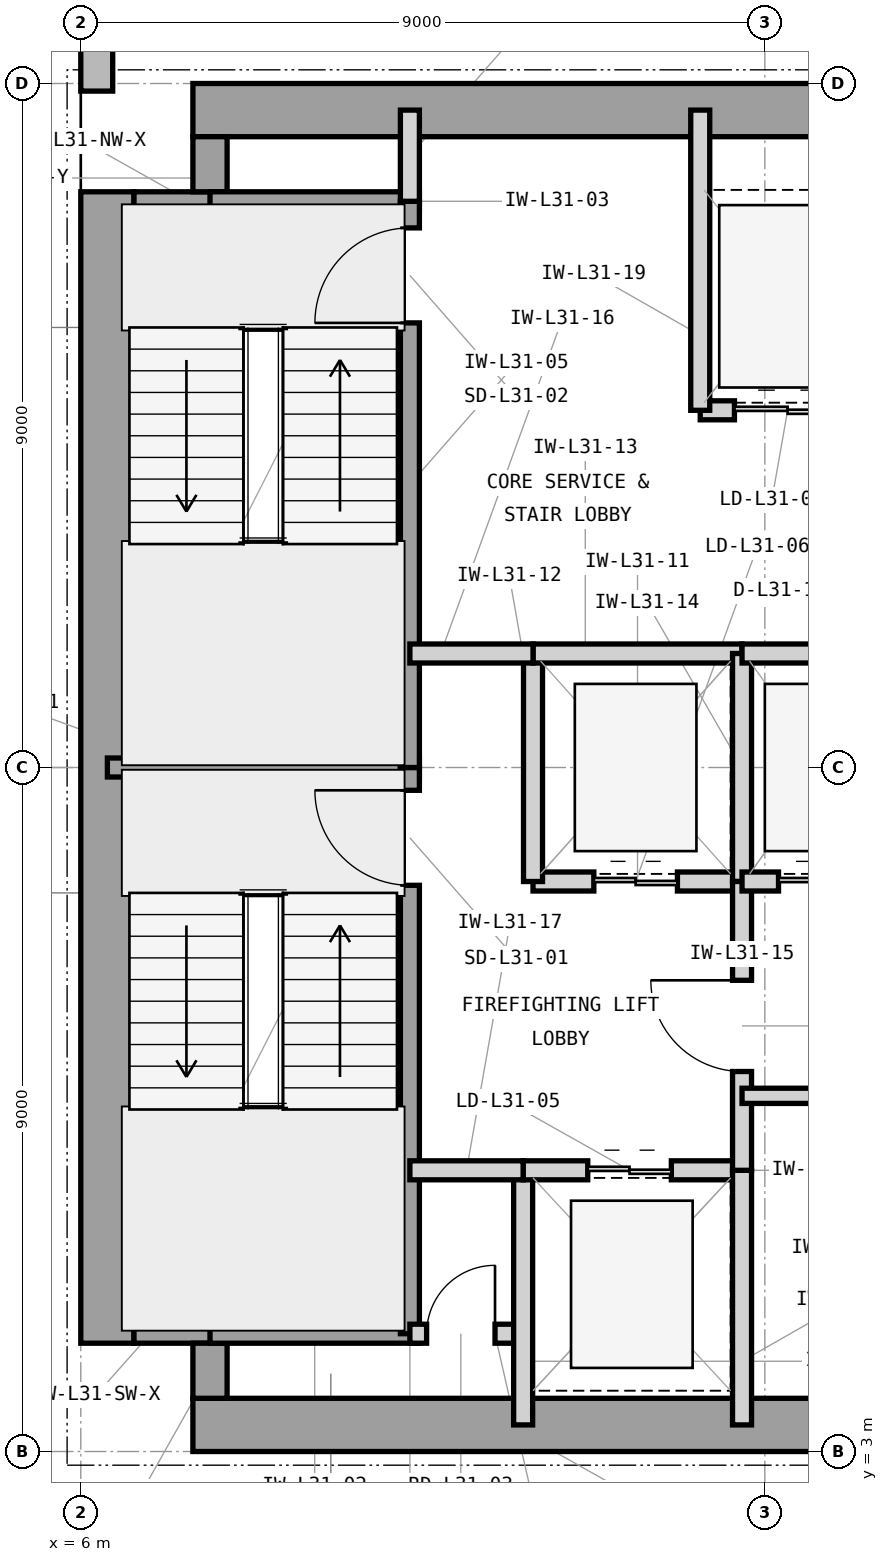
"""IFC4 building model, lengths in metres.
Left out: names, types, materials, properties, quantities, classifications, styles, units other than length and angle.
Written with IfcOpenShell. Run it as: python <this file> out.ifc"""

import sys

from ifc_helpers import new_model, si_unit, direction, frame, frame_2d, origin, place, context, subcontext, project, spatial, rectangle, extrude, element, fill, save


model = new_model("IFC4")
c1 = context("Model", 3, precision=1e-05, world=origin(), true_north=direction((0.0, 1.0)))
c2 = subcontext(c1, "Body", "Model", "MODEL_VIEW")
j1 = project(units=[si_unit("LENGTHUNIT", "METRE"), si_unit("PLANEANGLEUNIT", "RADIAN")], contexts=[c1])
p1 = place(None, origin())
s1 = spatial("IfcSite", under=j1, at=p1, CompositionType="ELEMENT")
p2 = place(p1, origin())
s2 = spatial("IfcBuilding", under=s1, at=p2, CompositionType="ELEMENT")
p3 = place(p2, frame((0.0, 0.0, 132.3)))
s3 = spatial("IfcBuildingStorey", under=s2, at=p3, CompositionType="ELEMENT", Elevation=132.3)
p4 = place(p3, frame((7.475, 3.35, 0.0), z_axis=(0.0, 0.0, 1.0), x_axis=(1.0, 0.0, 0.0)))
e1 = element("IfcWall", 1, at=p4, inside=s3, PredefinedType="SHEAR", context=c2, shape_type="SweptSolid", body=[
    extrude(rectangle(XDim=16.525, YDim=0.7, at=frame_2d((8.262, 0.0))), origin(), (0.0, 0.0, 1.0), 3.9),
])
p5 = place(p3, frame((6.35, 4.425, 0.0), z_axis=(0.0, 0.0, 1.0), x_axis=(0.0, 1.0, 0.0)))
e2 = element("IfcWall", 2, at=p5, inside=s3, PredefinedType="SHEAR", context=c2, shape_type="SweptSolid", body=[
    extrude(rectangle(XDim=15.15, YDim=0.7, at=frame_2d((7.575, 0.0))), origin(), (0.0, 0.0, 1.0), 3.9),
])
p6 = place(p3, frame((7.475, 20.65, 0.0), z_axis=(0.0, 0.0, 1.0), x_axis=(1.0, 0.0, 0.0)))
e3 = element("IfcWall", 3, at=p6, inside=s3, PredefinedType="SHEAR", context=c2, shape_type="SweptSolid", body=[
    extrude(rectangle(XDim=12.325, YDim=0.7, at=frame_2d((6.163, 0.0))), origin(), (0.0, 0.0, 1.0), 3.9),
])
p7 = place(p3, frame((6.7, 4.65, 0.0), z_axis=(0.0, 0.0, 1.0), x_axis=(1.0, 0.0, 0.0)))
e4 = element("IfcWall", 4, at=p7, inside=s3, PredefinedType="SHEAR", context=c2, shape_type="SweptSolid", body=[
    extrude(rectangle(XDim=1.225, YDim=0.45, at=frame_2d((0.613, 0.0))), origin(), (0.0, 0.0, 1.0), 3.9),
])
p8 = place(p3, frame((7.7, 3.7, 0.0), z_axis=(0.0, 0.0, 1.0), x_axis=(0.0, 1.0, 0.0)))
e5 = element("IfcWall", 5, at=p8, inside=s3, PredefinedType="SHEAR", context=c2, shape_type="SweptSolid", body=[
    extrude(rectangle(XDim=0.725, YDim=0.45, at=frame_2d((0.363, 0.0))), origin(), (0.0, 0.0, 1.0), 3.9),
])
p9 = place(p3, frame((6.7, 19.35, 0.0), z_axis=(0.0, 0.0, 1.0), x_axis=(1.0, 0.0, 0.0)))
e6 = element("IfcWall", 6, at=p9, inside=s3, PredefinedType="SHEAR", context=c2, shape_type="SweptSolid", body=[
    extrude(rectangle(XDim=1.225, YDim=0.45, at=frame_2d((0.613, 0.0))), origin(), (0.0, 0.0, 1.0), 3.9),
])
p10 = place(p3, frame((7.7, 19.575, 0.0), z_axis=(0.0, 0.0, 1.0), x_axis=(0.0, 1.0, 0.0)))
e7 = element("IfcWall", 7, at=p10, inside=s3, PredefinedType="SHEAR", context=c2, shape_type="SweptSolid", body=[
    extrude(rectangle(XDim=0.725, YDim=0.45, at=frame_2d((0.363, 0.0))), origin(), (0.0, 0.0, 1.0), 3.9),
])
p11 = place(p3, frame((6.21, 46.4, 0.0), z_axis=(0.0, 0.0, 1.0), x_axis=(0.0, -1.0, 0.0)))
e8 = element("IfcWall", 8, at=p11, inside=s3, PredefinedType="STANDARD", context=c2, shape_type="SweptSolid", body=[
    extrude(rectangle(XDim=25.5, YDim=0.42, at=frame_2d((12.75, 0.0))), origin(), (0.0, 0.0, 1.0), 3.7),
])
p12 = place(p11, frame((11.5, 0.0, 0.85)))
e9 = element("IfcOpeningElement", 9, at=p12, cuts=e8, PredefinedType="OPENING", context=c2, shape_type="SweptSolid", body=[
    extrude(rectangle(XDim=2.5, YDim=2.25, at=frame_2d((1.25, 1.125))), frame((0.0, 0.22, 0.0), z_axis=(0.0, -1.0, 0.0), x_axis=(1.0, 0.0, 0.0)), (0.0, 0.0, 1.0), 0.44),
])
p13 = place(p11, frame((8.236, 0.0, 0.85)))
e10 = element("IfcOpeningElement", 10, at=p13, cuts=e8, PredefinedType="OPENING", context=c2, shape_type="SweptSolid", body=[
    extrude(rectangle(XDim=1.2, YDim=2.25, at=frame_2d((0.6, 1.125))), frame((0.0, 0.22, 0.0), z_axis=(0.0, -1.0, 0.0), x_axis=(1.0, 0.0, 0.0)), (0.0, 0.0, 1.0), 0.44),
])
p14 = place(p3, frame((6.35, 12.0, 0.0), z_axis=(0.0, 0.0, 1.0), x_axis=(1.0, 0.0, 0.0)))
e11 = element("IfcWall", 11, at=p14, inside=s3, PredefinedType="SHEAR", context=c2, shape_type="SweptSolid", body=[
    extrude(rectangle(XDim=4.105, YDim=0.25, at=frame_2d((2.052, 0.0))), origin(), (0.0, 0.0, 1.0), 3.9),
])
for number, where, z_axis, x_axis in (
    (12, (7.7, 4.55, 0.0), (0.0, 0.0, 1.0), (1.0, 0.0, 0.0)),
    (13, (7.7, 19.45, 0.0), (0.0, 0.0, 1.0), (1.0, 0.0, 0.0)),
):
    element("IfcWall", number, at=place(p3, frame(where, z_axis=z_axis, x_axis=x_axis)), inside=s3, PredefinedType="SHEAR", context=c2, shape_type="SweptSolid", body=[
        extrude(rectangle(XDim=2.755, YDim=0.25, at=frame_2d((1.377, 0.0))), origin(), (0.0, 0.0, 1.0), 3.9),
    ])
p15 = place(p3, frame((10.33, 4.55, 0.0), z_axis=(0.0, 0.0, 1.0), x_axis=(0.0, 1.0, 0.0)))
e14 = element("IfcWall", 14, at=p15, inside=s3, PredefinedType="SHEAR", context=c2, shape_type="SweptSolid", body=[
    extrude(rectangle(XDim=7.45, YDim=0.25, at=frame_2d((3.725, 0.0))), origin(), (0.0, 0.0, 1.0), 3.9),
])
p16 = place(p15, frame((5.9, 0.0, 0.0)))
e15 = element("IfcOpeningElement", 15, at=p16, cuts=e14, PredefinedType="OPENING", context=c2, shape_type="SweptSolid", body=[
    extrude(rectangle(XDim=1.25, YDim=2.2, at=frame_2d((0.625, 1.1))), frame((0.0, 0.135, 0.0), z_axis=(0.0, -1.0, 0.0), x_axis=(1.0, 0.0, 0.0)), (0.0, 0.0, 1.0), 0.27),
])
p17 = place(p3, frame((10.33, 12.0, 0.0), z_axis=(0.0, 0.0, 1.0), x_axis=(0.0, 1.0, 0.0)))
e16 = element("IfcWall", 16, at=p17, inside=s3, PredefinedType="SHEAR", context=c2, shape_type="SweptSolid", body=[
    extrude(rectangle(XDim=7.45, YDim=0.25, at=frame_2d((3.725, 0.0))), origin(), (0.0, 0.0, 1.0), 3.9),
])
p18 = place(p17, frame((5.85, 0.0, 0.0)))
e17 = element("IfcOpeningElement", 17, at=p18, cuts=e16, PredefinedType="OPENING", context=c2, shape_type="SweptSolid", body=[
    extrude(rectangle(XDim=1.25, YDim=2.2, at=frame_2d((0.625, 1.1))), frame((0.0, 0.135, 0.0), z_axis=(0.0, -1.0, 0.0), x_axis=(1.0, 0.0, 0.0)), (0.0, 0.0, 1.0), 0.27),
])
p19 = place(p3, frame((10.33, 4.55, 0.0), z_axis=(0.0, 0.0, 1.0), x_axis=(1.0, 0.0, 0.0)))
e18 = element("IfcWall", 18, at=p19, inside=s3, PredefinedType="PARTITIONING", context=c2, shape_type="SweptSolid", body=[
    extrude(rectangle(XDim=1.49, YDim=0.25, at=frame_2d((0.745, 0.0))), origin(), (0.0, 0.0, 1.0), 3.69),
])
p20 = place(p19, frame((0.22, 0.0, 0.0)))
e19 = element("IfcOpeningElement", 19, at=p20, cuts=e18, PredefinedType="OPENING", context=c2, shape_type="SweptSolid", body=[
    extrude(rectangle(XDim=0.9, YDim=2.1, at=frame_2d((0.45, 1.05))), frame((0.0, 0.135, 0.0), z_axis=(0.0, -1.0, 0.0), x_axis=(1.0, 0.0, 0.0)), (0.0, 0.0, 1.0), 0.27),
])
p21 = place(p3, frame((11.82, 3.35, 0.0), z_axis=(0.0, 0.0, 1.0), x_axis=(0.0, 1.0, 0.0)))
e20 = element("IfcWall", 20, at=p21, inside=s3, PredefinedType="PARTITIONING", context=c2, shape_type="SweptSolid", body=[
    extrude(rectangle(XDim=3.35, YDim=0.25, at=frame_2d((1.675, 0.0))), origin(), (0.0, 0.0, 1.0), 3.69),
])
p22 = place(p3, frame((10.33, 19.45, 0.0), z_axis=(0.0, 0.0, 1.0), x_axis=(0.0, 1.0, 0.0)))
e21 = element("IfcWall", 21, at=p22, inside=s3, PredefinedType="PARTITIONING", context=c2, shape_type="SweptSolid", body=[
    extrude(rectangle(XDim=1.2, YDim=0.25, at=frame_2d((0.6, 0.0))), origin(), (0.0, 0.0, 1.0), 2.994),
])
p23 = place(p3, frame((11.82, 6.7, 0.0), z_axis=(0.0, 0.0, 1.0), x_axis=(1.0, 0.0, 0.0)))
e22 = element("IfcWall", 22, at=p23, inside=s3, PredefinedType="PARTITIONING", context=c2, shape_type="SweptSolid", body=[
    extrude(rectangle(XDim=2.88, YDim=0.25, at=frame_2d((1.44, 0.0))), origin(), (0.0, 0.0, 1.0), 3.233),
])
p24 = place(p23, frame((0.85, 0.0, 0.0)))
e23 = element("IfcOpeningElement", 23, at=p24, cuts=e22, PredefinedType="OPENING", context=c2, shape_type="SweptSolid", body=[
    extrude(rectangle(XDim=1.1, YDim=2.25, at=frame_2d((0.55, 1.125))), frame((0.0, 0.135, 0.0), z_axis=(0.0, -1.0, 0.0), x_axis=(1.0, 0.0, 0.0)), (0.0, 0.0, 1.0), 0.27),
])
p25 = place(p3, frame((14.7, 3.35, 0.0), z_axis=(0.0, 0.0, 1.0), x_axis=(0.0, 1.0, 0.0)))
e24 = element("IfcWall", 24, at=p25, inside=s3, PredefinedType="PARTITIONING", context=c2, shape_type="SweptSolid", body=[
    extrude(rectangle(XDim=3.35, YDim=0.25, at=frame_2d((1.675, 0.0))), origin(), (0.0, 0.0, 1.0), 3.69),
])
p26 = place(p3, frame((11.95, 10.5, 0.0), z_axis=(0.0, 0.0, 1.0), x_axis=(1.0, 0.0, 0.0)))
e25 = element("IfcWall", 25, at=p26, inside=s3, PredefinedType="PARTITIONING", context=c2, shape_type="SweptSolid", body=[
    extrude(rectangle(XDim=2.75, YDim=0.25, at=frame_2d((1.375, 0.0))), origin(), (0.0, 0.0, 1.0), 3.233),
])
p27 = place(p26, frame((0.8, 0.0, 0.0)))
e26 = element("IfcOpeningElement", 26, at=p27, cuts=e25, PredefinedType="OPENING", context=c2, shape_type="SweptSolid", body=[
    extrude(rectangle(XDim=1.1, YDim=2.25, at=frame_2d((0.55, 1.125))), frame((0.0, 0.135, 0.0), z_axis=(0.0, -1.0, 0.0), x_axis=(1.0, 0.0, 0.0)), (0.0, 0.0, 1.0), 0.27),
])
p28 = place(p3, frame((11.95, 10.5, 0.0), z_axis=(0.0, 0.0, 1.0), x_axis=(0.0, 1.0, 0.0)))
e27 = element("IfcWall", 27, at=p28, inside=s3, PredefinedType="PARTITIONING", context=c2, shape_type="SweptSolid", body=[
    extrude(rectangle(XDim=3.0, YDim=0.25, at=frame_2d((1.5, 0.0))), origin(), (0.0, 0.0, 1.0), 3.69),
])
p29 = place(p3, frame((11.95, 13.5, 0.0), z_axis=(0.0, 0.0, 1.0), x_axis=(1.0, 0.0, 0.0)))
e28 = element("IfcWall", 28, at=p29, inside=s3, PredefinedType="PARTITIONING", context=c2, shape_type="SweptSolid", body=[
    extrude(rectangle(XDim=2.75, YDim=0.25, at=frame_2d((1.375, 0.0))), origin(), (0.0, 0.0, 1.0), 3.233),
])
p30 = place(p3, frame((14.7, 10.5, 0.0), z_axis=(0.0, 0.0, 1.0), x_axis=(0.0, 1.0, 0.0)))
e29 = element("IfcWall", 29, at=p30, inside=s3, PredefinedType="PARTITIONING", context=c2, shape_type="SweptSolid", body=[
    extrude(rectangle(XDim=3.0, YDim=0.25, at=frame_2d((1.5, 0.0))), origin(), (0.0, 0.0, 1.0), 3.69),
])
p31 = place(p3, frame((14.7, 6.7, 0.0), z_axis=(0.0, 0.0, 1.0), x_axis=(0.0, 1.0, 0.0)))
e30 = element("IfcWall", 30, at=p31, inside=s3, PredefinedType="PARTITIONING", context=c2, shape_type="SweptSolid", body=[
    extrude(rectangle(XDim=3.8, YDim=0.25, at=frame_2d((1.9, 0.0))), origin(), (0.0, 0.0, 1.0), 3.69),
])
p32 = place(p31, frame((1.3, 0.0, 0.0)))
e31 = element("IfcOpeningElement", 31, at=p32, cuts=e30, PredefinedType="OPENING", context=c2, shape_type="SweptSolid", body=[
    extrude(rectangle(XDim=1.2, YDim=2.2, at=frame_2d((0.6, 1.1))), frame((0.0, 0.135, 0.0), z_axis=(0.0, -1.0, 0.0), x_axis=(1.0, 0.0, 0.0)), (0.0, 0.0, 1.0), 0.27),
])
p33 = place(p3, frame((10.33, 13.5, 0.0), z_axis=(0.0, 0.0, 1.0), x_axis=(1.0, 0.0, 0.0)))
e32 = element("IfcWall", 32, at=p33, inside=s3, PredefinedType="PARTITIONING", context=c2, shape_type="SweptSolid", body=[
    extrude(rectangle(XDim=1.62, YDim=0.25, at=frame_2d((0.81, 0.0))), origin(), (0.0, 0.0, 1.0), 3.233),
])
p34 = place(p3, frame((10.33, 6.7, 0.0), z_axis=(0.0, 0.0, 1.0), x_axis=(1.0, 0.0, 0.0)))
e33 = element("IfcWall", 33, at=p34, inside=s3, PredefinedType="PARTITIONING", context=c2, shape_type="SweptSolid", body=[
    extrude(rectangle(XDim=1.49, YDim=0.25, at=frame_2d((0.745, 0.0))), origin(), (0.0, 0.0, 1.0), 3.233),
])
p35 = place(p3, frame((14.15, 16.7, 0.0), z_axis=(0.0, 0.0, 1.0), x_axis=(1.0, 0.0, 0.0)))
e34 = element("IfcWall", 34, at=p35, inside=s3, PredefinedType="PARTITIONING", context=c2, shape_type="SweptSolid", body=[
    extrude(rectangle(XDim=2.3, YDim=0.25, at=frame_2d((1.15, 0.0))), origin(), (0.0, 0.0, 1.0), 3.233),
])
p36 = place(p35, frame((0.45, 0.0, 0.0)))
e35 = element("IfcOpeningElement", 35, at=p36, cuts=e34, PredefinedType="OPENING", context=c2, shape_type="SweptSolid", body=[
    extrude(rectangle(XDim=1.4, YDim=2.35, at=frame_2d((0.7, 1.175))), frame((0.0, 0.135, 0.0), z_axis=(0.0, -1.0, 0.0), x_axis=(1.0, 0.0, 0.0)), (0.0, 0.0, 1.0), 0.27),
])
p37 = place(p3, frame((14.15, 16.7, 0.0), z_axis=(0.0, 0.0, 1.0), x_axis=(0.0, 1.0, 0.0)))
e36 = element("IfcWall", 36, at=p37, inside=s3, PredefinedType="PARTITIONING", context=c2, shape_type="SweptSolid", body=[
    extrude(rectangle(XDim=3.95, YDim=0.25, at=frame_2d((1.975, 0.0))), origin(), (0.0, 0.0, 1.0), 3.69),
])
p38 = place(p3, frame((14.7, 7.68, 0.0), z_axis=(0.0, 0.0, 1.0), x_axis=(1.0, 0.0, 0.0)))
e37 = element("IfcWall", 37, at=p38, inside=s3, PredefinedType="PARTITIONING", context=c2, shape_type="SweptSolid", body=[
    extrude(rectangle(XDim=2.85, YDim=0.2, at=frame_2d((1.425, 0.0))), origin(), (0.0, 0.0, 1.0), 3.69),
])
p39 = place(p38, frame((0.925, 0.0, 0.0)))
e38 = element("IfcOpeningElement", 38, at=p39, cuts=e37, PredefinedType="OPENING", context=c2, shape_type="SweptSolid", body=[
    extrude(rectangle(XDim=1.0, YDim=2.15, at=frame_2d((0.5, 1.075))), frame((0.0, 0.11, 0.0), z_axis=(0.0, -1.0, 0.0), x_axis=(1.0, 0.0, 0.0)), (0.0, 0.0, 1.0), 0.22),
])
p40 = place(p3, frame((14.7, 10.5, 0.0), z_axis=(0.0, 0.0, 1.0), x_axis=(1.0, 0.0, 0.0)))
e39 = element("IfcWall", 39, at=p40, inside=s3, PredefinedType="PARTITIONING", context=c2, shape_type="SweptSolid", body=[
    extrude(rectangle(XDim=2.15, YDim=0.25, at=frame_2d((1.075, 0.0))), origin(), (0.0, 0.0, 1.0), 3.233),
])
p41 = place(p40, frame((0.48, 0.0, 0.0)))
e40 = element("IfcOpeningElement", 40, at=p41, cuts=e39, PredefinedType="OPENING", context=c2, shape_type="SweptSolid", body=[
    extrude(rectangle(XDim=1.15, YDim=2.25, at=frame_2d((0.575, 1.125))), frame((0.0, 0.135, 0.0), z_axis=(0.0, -1.0, 0.0), x_axis=(1.0, 0.0, 0.0)), (0.0, 0.0, 1.0), 0.27),
])
p42 = place(p3, frame((14.7, 13.5, 0.0), z_axis=(0.0, 0.0, 1.0), x_axis=(1.0, 0.0, 0.0)))
e41 = element("IfcWall", 41, at=p42, inside=s3, PredefinedType="PARTITIONING", context=c2, shape_type="SweptSolid", body=[
    extrude(rectangle(XDim=8.95, YDim=0.25, at=frame_2d((4.475, 0.0))), origin(), (0.0, 0.0, 1.0), 3.233),
])
p43 = place(p16, origin())
e42 = element("IfcDoor", 42, at=p43, inside=s3, OperationType="SINGLE_SWING_RIGHT", PredefinedType="DOOR", context=c2, shape_type="SweptSolid", body=[
    extrude(rectangle(XDim=1.25, YDim=2.2, at=frame_2d((0.625, 1.1))), frame((0.0, 0.025, 0.0), z_axis=(0.0, -1.0, 0.0), x_axis=(1.0, 0.0, 0.0)), (0.0, 0.0, 1.0), 0.05),
])
fill(e15, e42)
p44 = place(p18, origin())
e43 = element("IfcDoor", 43, at=p44, inside=s3, OperationType="SINGLE_SWING_LEFT", PredefinedType="DOOR", context=c2, shape_type="SweptSolid", body=[
    extrude(rectangle(XDim=1.25, YDim=2.2, at=frame_2d((0.625, 1.1))), frame((0.0, 0.025, 0.0), z_axis=(0.0, -1.0, 0.0), x_axis=(1.0, 0.0, 0.0)), (0.0, 0.0, 1.0), 0.05),
])
fill(e17, e43)
p45 = place(p20, origin())
e44 = element("IfcDoor", 44, at=p45, inside=s3, OperationType="SINGLE_SWING_RIGHT", PredefinedType="TRAPDOOR", context=c2, shape_type="SweptSolid", body=[
    extrude(rectangle(XDim=0.9, YDim=2.1, at=frame_2d((0.45, 1.05))), frame((0.0, 0.025, 0.0), z_axis=(0.0, -1.0, 0.0), x_axis=(1.0, 0.0, 0.0)), (0.0, 0.0, 1.0), 0.05),
])
fill(e19, e44)
p46 = place(p24, origin())
e45 = element("IfcDoor", 45, at=p46, inside=s3, OperationType="DOUBLE_DOOR_SLIDING", PredefinedType="DOOR", context=c2, shape_type="SweptSolid", body=[
    extrude(rectangle(XDim=1.1, YDim=2.25, at=frame_2d((0.55, 1.125))), frame((0.0, 0.025, 0.0), z_axis=(0.0, -1.0, 0.0), x_axis=(1.0, 0.0, 0.0)), (0.0, 0.0, 1.0), 0.05),
])
fill(e23, e45)
p47 = place(p27, origin())
e46 = element("IfcDoor", 46, at=p47, inside=s3, OperationType="DOUBLE_DOOR_SLIDING", PredefinedType="DOOR", context=c2, shape_type="SweptSolid", body=[
    extrude(rectangle(XDim=1.1, YDim=2.25, at=frame_2d((0.55, 1.125))), frame((0.0, 0.025, 0.0), z_axis=(0.0, -1.0, 0.0), x_axis=(1.0, 0.0, 0.0)), (0.0, 0.0, 1.0), 0.05),
])
fill(e26, e46)
p48 = place(p32, origin())
e47 = element("IfcDoor", 47, at=p48, inside=s3, OperationType="SINGLE_SWING_RIGHT", PredefinedType="DOOR", context=c2, shape_type="SweptSolid", body=[
    extrude(rectangle(XDim=1.2, YDim=2.2, at=frame_2d((0.6, 1.1))), frame((0.0, 0.025, 0.0), z_axis=(0.0, -1.0, 0.0), x_axis=(1.0, 0.0, 0.0)), (0.0, 0.0, 1.0), 0.05),
])
fill(e31, e47)
p49 = place(p36, origin())
e48 = element("IfcDoor", 48, at=p49, inside=s3, OperationType="DOUBLE_DOOR_SLIDING", PredefinedType="DOOR", context=c2, shape_type="SweptSolid", body=[
    extrude(rectangle(XDim=1.4, YDim=2.35, at=frame_2d((0.7, 1.175))), frame((0.0, 0.025, 0.0), z_axis=(0.0, -1.0, 0.0), x_axis=(1.0, 0.0, 0.0)), (0.0, 0.0, 1.0), 0.05),
])
fill(e35, e48)
p50 = place(p41, origin())
e49 = element("IfcDoor", 49, at=p50, inside=s3, OperationType="DOUBLE_DOOR_SLIDING", PredefinedType="DOOR", context=c2, shape_type="SweptSolid", body=[
    extrude(rectangle(XDim=1.15, YDim=2.25, at=frame_2d((0.575, 1.125))), frame((0.0, 0.025, 0.0), z_axis=(0.0, -1.0, 0.0), x_axis=(1.0, 0.0, 0.0)), (0.0, 0.0, 1.0), 0.05),
])
fill(e40, e49)
save(model, sys.argv[1])
